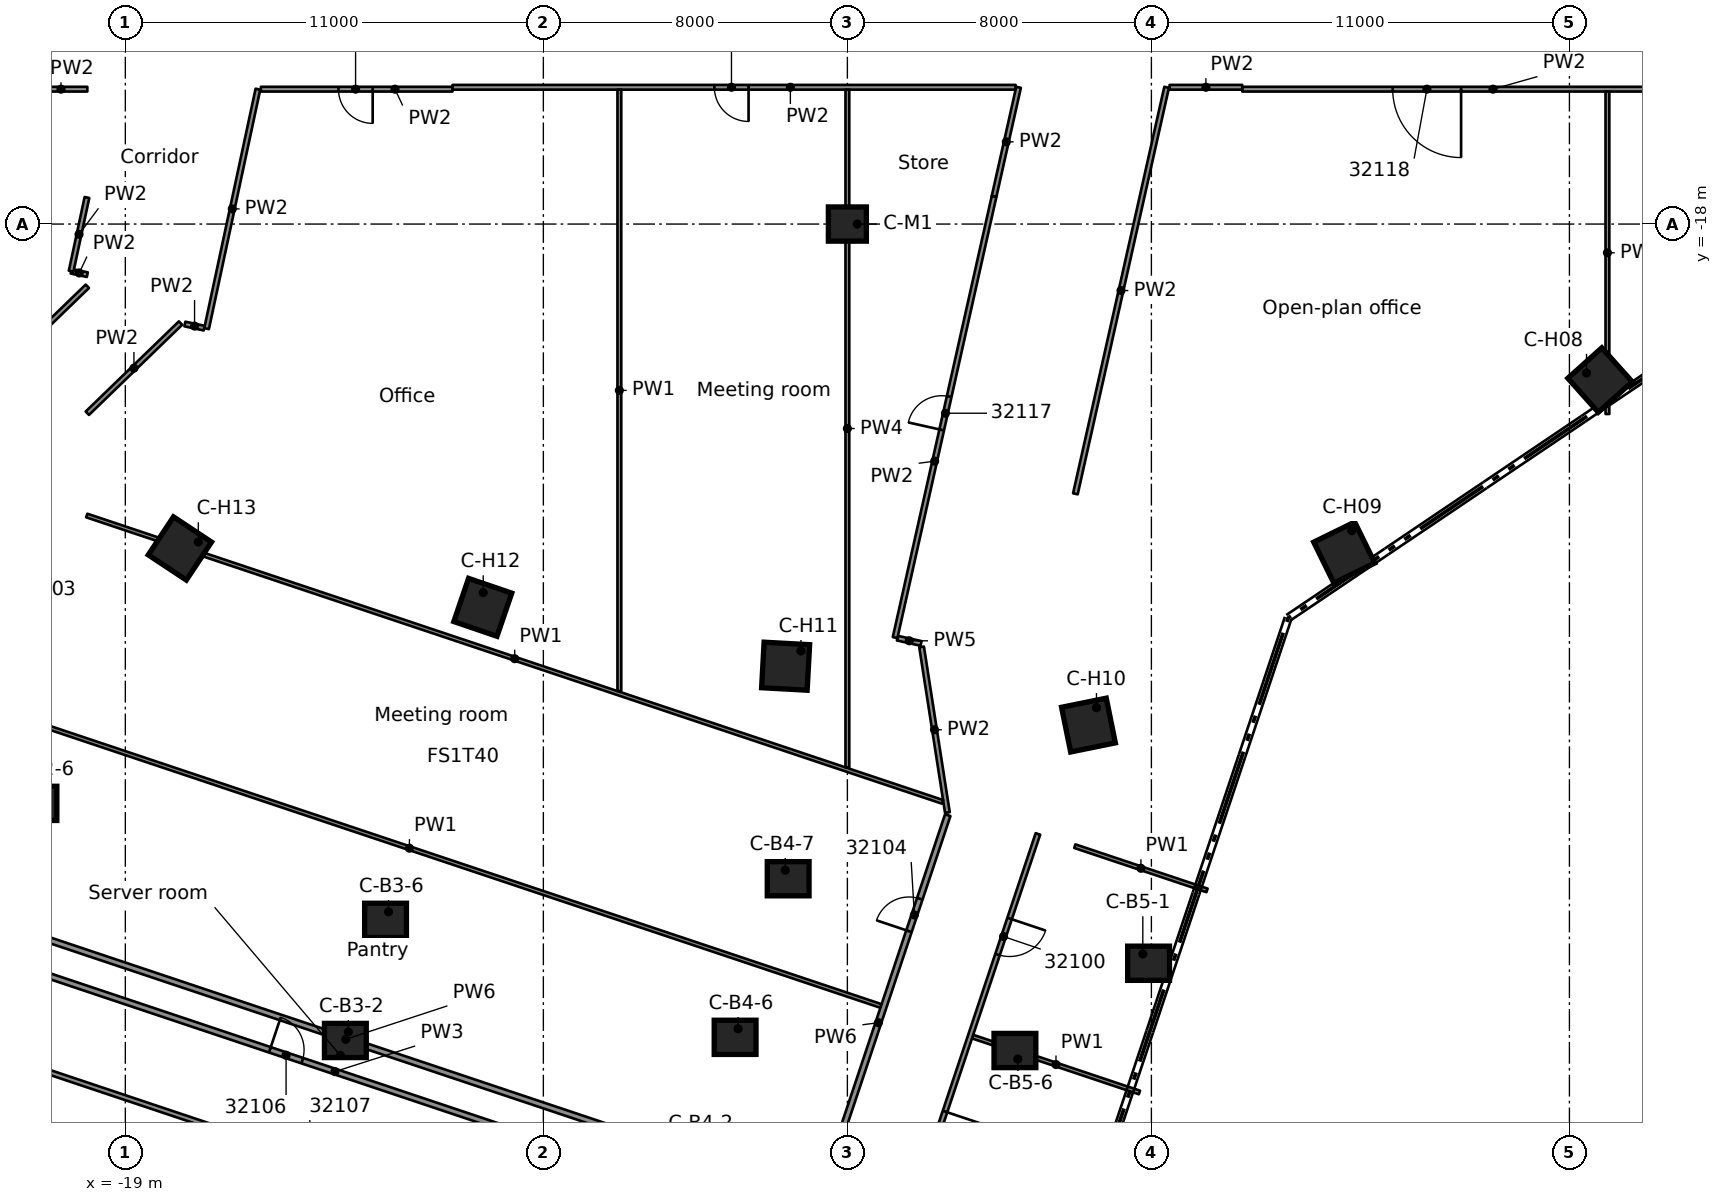
"""IFC4 building model, lengths in metres.
Left out: names, types, materials, properties, quantities, classifications, styles, units other than length and angle.
Written with IfcOpenShell. Run it as: python <this file> out.ifc"""

import sys

from ifc_helpers import new_model, si_unit, direction, frame, frame_2d, origin, origin_2d, place, context, subcontext, project, spatial, rectangle, extrude, element, fill, save


model = new_model("IFC4")
c1 = context("Model", 3, precision=1e-05, world=origin(), true_north=direction((0.0, 1.0)))
c2 = subcontext(c1, "Body", "Model", "MODEL_VIEW")
j1 = project(units=[si_unit("LENGTHUNIT", "METRE"), si_unit("PLANEANGLEUNIT", "RADIAN")], contexts=[c1])
p1 = place(None, origin())
s1 = spatial("IfcSite", under=j1, at=p1, CompositionType="ELEMENT")
p2 = place(p1, origin())
s2 = spatial("IfcBuilding", under=s1, at=p2, CompositionType="ELEMENT")
p3 = place(p2, frame((0.0, 0.0, 159.6)))
s3 = spatial("IfcBuildingStorey", under=s2, at=p3, CompositionType="ELEMENT", Elevation=159.6)
for number, where, z_axis, x_axis in (
    (1, (-21.352, -33.243, 0.0), (0.0, 0.0, 1.0), (1.0, 0.0, 0.0)),
    (2, (-13.21, -39.482, 0.0), (0.0, 0.0, 1.0), (1.0, 0.0, 0.0)),
    (3, (-12.153, -36.321, 0.0), (0.0, 0.0, 1.0), (1.0, 0.0, 0.0)),
    (4, (-2.954, -39.399, 0.0), (0.0, 0.0, 1.0), (1.0, 0.0, 0.0)),
    (5, (-1.558, -35.226, 0.0), (0.0, 0.0, 1.0), (1.0, 0.0, 0.0)),
    (6, (7.926, -37.45, 0.0), (0.0, 0.0, 1.0), (1.0, 0.0, 0.0)),
    (7, (4.409, -39.746, 0.0), (0.0, 0.0, 1.0), (1.0, 0.0, 0.0)),
):
    element("IfcColumn", number, at=place(p3, frame(where, z_axis=z_axis, x_axis=x_axis)), inside=s3, PredefinedType="COLUMN", context=c2, shape_type="SweptSolid", body=[
        extrude(rectangle(XDim=1.1, YDim=0.9, at=origin_2d()), origin(), (0.0, 0.0, 1.0), 3.5),
    ])
for number, where, z_axis, x_axis in (
    (8, (19.806, -22.104, 0.0), (0.0, 0.0, 1.0), (0.667, -0.745, 0.0)),
    (9, (13.075, -26.644, 0.0), (0.0, 0.0, 1.0), (0.441, -0.898, 0.0)),
    (10, (6.344, -31.183, 0.0), (0.0, 0.0, 1.0), (0.199, -0.98, 0.0)),
    (11, (-1.625, -29.634, 0.0), (0.0, 0.0, 1.0), (-0.055, -0.998, 0.0)),
    (12, (-9.594, -28.085, 0.0), (0.0, 0.0, 1.0), (-0.323, -0.946, 0.0)),
    (13, (-17.564, -26.536, 0.0), (0.0, 0.0, 1.0), (-0.552, -0.834, 0.0)),
):
    element("IfcColumn", number, at=place(p3, frame(where, z_axis=z_axis, x_axis=x_axis)), inside=s3, PredefinedType="COLUMN", context=c2, shape_type="SweptSolid", body=[
        extrude(rectangle(XDim=1.2, YDim=1.2, at=origin_2d()), origin(), (0.0, 0.0, 1.0), 3.5),
    ])
p4 = place(p3, frame((0.0, -18.0, 0.0), z_axis=(0.0, 0.0, 1.0), x_axis=(1.0, 0.0, 0.0)))
e14 = element("IfcColumn", 14, at=p4, inside=s3, PredefinedType="COLUMN", context=c2, shape_type="SweptSolid", body=[
    extrude(rectangle(XDim=1.0, YDim=0.9, at=origin_2d()), origin(), (0.0, 0.0, 1.0), 3.5),
])
p5 = place(p3, frame((2.632, -33.485, 0.0), z_axis=(0.0, 0.0, 1.0), x_axis=(-0.153953145405, 0.988078149247, 0.0)))
e15 = element("IfcWall", 15, at=p5, inside=s3, PredefinedType="PARTITIONING", context=c2, shape_type="SweptSolid", body=[
    extrude(rectangle(XDim=4.412, YDim=0.125, at=frame_2d((2.206, 0.0))), origin(), (0.0, 0.0, 1.0), 3.08),
])
p6 = place(p3, frame((-1.829, -46.732, 0.0), z_axis=(0.0, 0.0, 1.0), x_axis=(-0.948329366448, 0.317287586791, 0.0)))
e16 = element("IfcWall", 16, at=p6, inside=s3, PredefinedType="PARTITIONING", context=c2, shape_type="SweptSolid", body=[
    extrude(rectangle(XDim=26.187, YDim=0.125, at=frame_2d((13.094, 0.0))), origin(), (0.0, 0.0, 1.0), 3.08),
])
p7 = place(p6, frame((12.538, 0.0, 0.0)))
e17 = element("IfcOpeningElement", 17, at=p7, cuts=e16, PredefinedType="OPENING", context=c2, shape_type="SweptSolid", body=[
    extrude(rectangle(XDim=0.9, YDim=2.1, at=frame_2d((0.45, 1.05))), frame((0.0, 0.073, 0.0), z_axis=(0.0, -1.0, 0.0), x_axis=(1.0, 0.0, 0.0)), (0.0, 0.0, 1.0), 0.145),
])
p8 = place(p3, frame((-25.889, -36.15, 0.0), z_axis=(0.0, 0.0, 1.0), x_axis=(0.94832621322, -0.317297011205, 0.0)))
e18 = element("IfcWall", 18, at=p8, inside=s3, PredefinedType="PARTITIONING", context=c2, shape_type="SweptSolid", body=[
    extrude(rectangle(XDim=26.162, YDim=0.15, at=frame_2d((13.081, 0.0))), origin(), (0.0, 0.0, 1.0), 3.08),
])
p9 = place(p8, frame((11.275, 0.0, 0.0)))
e19 = element("IfcOpeningElement", 19, at=p9, cuts=e18, PredefinedType="OPENING", context=c2, shape_type="SweptSolid", body=[
    extrude(rectangle(XDim=0.9, YDim=2.1, at=frame_2d((0.45, 1.05))), frame((0.0, 0.085, 0.0), z_axis=(0.0, -1.0, 0.0), x_axis=(1.0, 0.0, 0.0)), (0.0, 0.0, 1.0), 0.17),
])
p10 = place(p3, frame((-25.605, -35.3, 0.0), z_axis=(0.0, 0.0, 1.0), x_axis=(0.948327152728, -0.317294203223, 0.0)))
e20 = element("IfcWall", 20, at=p10, inside=s3, PredefinedType="PARTITIONING", context=c2, shape_type="SweptSolid", body=[
    extrude(rectangle(XDim=26.162, YDim=0.15, at=frame_2d((13.081, 0.0))), origin(), (0.0, 0.0, 1.0), 2.445),
])
p11 = place(p3, frame((-23.935, -30.27, 0.0), z_axis=(0.0, 0.0, 1.0), x_axis=(0.948328260126, -0.317290893418, 0.0)))
e21 = element("IfcWall", 21, at=p11, inside=s3, PredefinedType="PARTITIONING", context=c2, shape_type="SweptSolid", body=[
    extrude(rectangle(XDim=26.175, YDim=0.1, at=frame_2d((13.087, 0.0))), origin(), (0.0, 0.0, 1.0), 3.08),
])
p12 = place(p3, frame((3.294, -39.38, 0.0), z_axis=(0.0, 0.0, 1.0), x_axis=(0.948260676976, -0.317492816455, 0.0)))
e22 = element("IfcWall", 22, at=p12, inside=s3, PredefinedType="PARTITIONING", context=c2, shape_type="SweptSolid", body=[
    extrude(rectangle(XDim=4.631, YDim=0.1, at=frame_2d((2.315, 0.0))), origin(), (0.0, 0.0, 1.0), 3.08),
])
p13 = place(p3, frame((-20.015, -25.669, 0.0), z_axis=(0.0, 0.0, 1.0), x_axis=(0.948326995597, -0.317294672854, 0.0)))
e23 = element("IfcWall", 23, at=p13, inside=s3, PredefinedType="PARTITIONING", context=c2, shape_type="SweptSolid", body=[
    extrude(rectangle(XDim=23.748, YDim=0.1, at=frame_2d((11.874, 0.0))), origin(), (0.0, 0.0, 1.0), 3.08),
])
p14 = place(p3, frame((5.985, -34.369, 0.0), z_axis=(0.0, 0.0, 1.0), x_axis=(0.948323320845, -0.317305655704, 0.0)))
e24 = element("IfcWall", 24, at=p14, inside=s3, PredefinedType="PARTITIONING", context=c2, shape_type="SweptSolid", body=[
    extrude(rectangle(XDim=3.669, YDim=0.1, at=frame_2d((1.834, 0.0))), origin(), (0.0, 0.0, 1.0), 3.08),
])
p15 = place(p3, frame((1.317, -28.896, 0.0), z_axis=(0.0, 0.0, 1.0), x_axis=(0.9759612217, -0.217944244563, 0.0)))
e25 = element("IfcWall", 25, at=p15, inside=s3, PredefinedType="PARTITIONING", context=c2, shape_type="SweptSolid", body=[
    extrude(rectangle(XDim=0.637, YDim=0.125, at=frame_2d((0.319, 0.0))), origin(), (0.0, 0.0, 1.0), 2.445),
])
p16 = place(p3, frame((-17.433, -20.63, 0.0), z_axis=(0.0, 0.0, 1.0), x_axis=(0.977781820865, -0.209625167351, 0.0)))
e26 = element("IfcWall", 26, at=p16, inside=s3, PredefinedType="PARTITIONING", context=c2, shape_type="SweptSolid", body=[
    extrude(rectangle(XDim=0.521, YDim=0.125, at=frame_2d((0.26, 0.0))), origin(), (0.0, 0.0, 1.0), 3.08),
])
p17 = place(p3, frame((-20.425, -19.241, 0.0), z_axis=(0.0, 0.0, 1.0), x_axis=(0.977810632408, -0.209490732848, 0.0)))
e27 = element("IfcWall", 27, at=p17, inside=s3, PredefinedType="PARTITIONING", context=c2, shape_type="SweptSolid", body=[
    extrude(rectangle(XDim=0.435, YDim=0.125, at=frame_2d((0.217, 0.0))), origin(), (0.0, 0.0, 1.0), 3.08),
])
p18 = place(p3, frame((-21.387, -14.451, 0.0), z_axis=(0.0, 0.0, 1.0), x_axis=(1.0, 0.0, 0.0)))
e28 = element("IfcWall", 28, at=p18, inside=s3, PredefinedType="PARTITIONING", context=c2, shape_type="SweptSolid", body=[
    extrude(rectangle(XDim=1.387, YDim=0.125, at=frame_2d((0.693, 0.0))), origin(), (0.0, 0.0, 1.0), 3.08),
])
p19 = place(p3, frame((-10.391, -14.451, 0.0), z_axis=(0.0, 0.0, 1.0), x_axis=(-1.0, 0.0, 0.0)))
e29 = element("IfcWall", 29, at=p19, inside=s3, PredefinedType="PARTITIONING", context=c2, shape_type="SweptSolid", body=[
    extrude(rectangle(XDim=5.043, YDim=0.125, at=frame_2d((2.521, 0.0))), origin(), (0.0, 0.0, 1.0), 3.08),
])
p20 = place(p19, frame((2.1, 0.0, 0.0)))
e30 = element("IfcOpeningElement", 30, at=p20, cuts=e29, PredefinedType="OPENING", context=c2, shape_type="SweptSolid", body=[
    extrude(rectangle(XDim=0.9, YDim=2.1, at=frame_2d((0.45, 1.05))), frame((0.0, 0.073, 0.0), z_axis=(0.0, -1.0, 0.0), x_axis=(1.0, 0.0, 0.0)), (0.0, 0.0, 1.0), 0.145),
])
p21 = place(p3, frame((21.387, -14.451, 0.0), z_axis=(0.0, 0.0, 1.0), x_axis=(-1.0, 0.0, 0.0)))
e31 = element("IfcWall", 31, at=p21, inside=s3, PredefinedType="PARTITIONING", context=c2, shape_type="SweptSolid", body=[
    extrude(rectangle(XDim=10.996, YDim=0.125, at=frame_2d((5.498, 0.0))), origin(), (0.0, 0.0, 1.0), 3.08),
])
p22 = place(p21, frame((5.238, 0.0, 0.0)))
e32 = element("IfcOpeningElement", 32, at=p22, cuts=e31, PredefinedType="OPENING", context=c2, shape_type="SweptSolid", body=[
    extrude(rectangle(XDim=1.8, YDim=2.1, at=frame_2d((0.9, 1.05))), frame((0.0, 0.073, 0.0), z_axis=(0.0, -1.0, 0.0), x_axis=(1.0, 0.0, 0.0)), (0.0, 0.0, 1.0), 0.145),
])
p23 = place(p3, frame((4.427, -14.401, 0.0), z_axis=(0.0, 0.0, 1.0), x_axis=(-1.0, 0.0, 0.0)))
e33 = element("IfcWall", 33, at=p23, inside=s3, PredefinedType="PARTITIONING", context=c2, shape_type="SweptSolid", body=[
    extrude(rectangle(XDim=14.817, YDim=0.125, at=frame_2d((7.408, 0.0))), origin(), (0.0, 0.0, 1.0), 3.08),
])
p24 = place(p23, frame((7.027, 0.0, 0.0)))
e34 = element("IfcOpeningElement", 34, at=p24, cuts=e33, PredefinedType="OPENING", context=c2, shape_type="SweptSolid", body=[
    extrude(rectangle(XDim=0.9, YDim=2.1, at=frame_2d((0.45, 1.05))), frame((0.0, 0.073, 0.0), z_axis=(0.0, -1.0, 0.0), x_axis=(1.0, 0.0, 0.0)), (0.0, 0.0, 1.0), 0.145),
])
p25 = place(p3, frame((8.479, -14.401, 0.0), z_axis=(0.0, 0.0, 1.0), x_axis=(1.0, 0.0, 0.0)))
e35 = element("IfcWall", 35, at=p25, inside=s3, PredefinedType="PARTITIONING", context=c2, shape_type="SweptSolid", body=[
    extrude(rectangle(XDim=1.912, YDim=0.125, at=frame_2d((0.956, 0.0))), origin(), (0.0, 0.0, 1.0), 3.08),
])
p26 = place(p3, frame((-24.354, -23.85, 0.0), z_axis=(0.0, 0.0, 1.0), x_axis=(0.718717121229, 0.695302595747, 0.0)))
e36 = element("IfcWall", 36, at=p26, inside=s3, PredefinedType="PARTITIONING", context=c2, shape_type="SweptSolid", body=[
    extrude(rectangle(XDim=6.058, YDim=0.125, at=frame_2d((3.029, 0.0))), origin(), (0.0, 0.0, 1.0), 3.08),
])
p27 = place(p3, frame((-20.0, -22.978, 0.0), z_axis=(0.0, 0.0, 1.0), x_axis=(0.718705918195, 0.695314175859, 0.0)))
e37 = element("IfcWall", 37, at=p27, inside=s3, PredefinedType="PARTITIONING", context=c2, shape_type="SweptSolid", body=[
    extrude(rectangle(XDim=3.413, YDim=0.125, at=frame_2d((1.707, 0.0))), origin(), (0.0, 0.0, 1.0), 3.08),
])
p28 = place(p3, frame((5.014, -34.047, 0.0), z_axis=(0.0, 0.0, 1.0), x_axis=(-0.317385597106, -0.948296568986, 0.0)))
e38 = element("IfcWall", 38, at=p28, inside=s3, PredefinedType="PARTITIONING", context=c2, shape_type="SweptSolid", body=[
    extrude(rectangle(XDim=18.151, YDim=0.125, at=frame_2d((9.076, 0.0))), origin(), (0.0, 0.0, 1.0), 2.445),
])
p29 = place(p28, frame((2.347, 0.0, 0.0)))
e39 = element("IfcOpeningElement", 39, at=p29, cuts=e38, PredefinedType="OPENING", context=c2, shape_type="SweptSolid", body=[
    extrude(rectangle(XDim=1.0, YDim=2.1, at=frame_2d((0.5, 1.05))), frame((0.0, 0.073, 0.0), z_axis=(0.0, -1.0, 0.0), x_axis=(1.0, 0.0, 0.0)), (0.0, 0.0, 1.0), 0.145),
])
p30 = place(p28, frame((7.703, 0.0, 0.0)))
e40 = element("IfcOpeningElement", 40, at=p30, cuts=e38, PredefinedType="OPENING", context=c2, shape_type="SweptSolid", body=[
    extrude(rectangle(XDim=1.0, YDim=2.1, at=frame_2d((0.5, 1.05))), frame((0.0, 0.073, 0.0), z_axis=(0.0, -1.0, 0.0), x_axis=(1.0, 0.0, 0.0)), (0.0, 0.0, 1.0), 0.145),
])
p31 = place(p28, frame((12.399, 0.0, 0.0)))
e41 = element("IfcOpeningElement", 41, at=p31, cuts=e38, PredefinedType="OPENING", context=c2, shape_type="SweptSolid", body=[
    extrude(rectangle(XDim=1.0, YDim=2.1, at=frame_2d((0.5, 1.05))), frame((0.0, 0.073, 0.0), z_axis=(0.0, -1.0, 0.0), x_axis=(1.0, 0.0, 0.0)), (0.0, 0.0, 1.0), 0.145),
])
p32 = place(p3, frame((-1.008, -44.475, 0.0), z_axis=(0.0, 0.0, 1.0), x_axis=(0.316889155775, 0.948462578572, 0.0)))
e42 = element("IfcWall", 42, at=p32, inside=s3, PredefinedType="PARTITIONING", context=c2, shape_type="SweptSolid", body=[
    extrude(rectangle(XDim=11.516, YDim=0.15, at=frame_2d((5.758, 0.0))), origin(), (0.0, 0.0, 1.0), 2.445),
])
p33 = place(p32, frame((8.296, 0.0, 0.0)))
e43 = element("IfcOpeningElement", 43, at=p33, cuts=e42, PredefinedType="OPENING", context=c2, shape_type="SweptSolid", body=[
    extrude(rectangle(XDim=0.9, YDim=2.1, at=frame_2d((0.45, 1.05))), frame((0.0, 0.085, 0.0), z_axis=(0.0, -1.0, 0.0), x_axis=(1.0, 0.0, 0.0)), (0.0, 0.0, 1.0), 0.17),
])
p34 = place(p3, frame((8.401, -14.401, 0.0), z_axis=(0.0, 0.0, 1.0), x_axis=(-0.218995507843, -0.975725867006, 0.0)))
e44 = element("IfcWall", 44, at=p34, inside=s3, PredefinedType="PARTITIONING", context=c2, shape_type="SweptSolid", body=[
    extrude(rectangle(XDim=10.963, YDim=0.125, at=frame_2d((5.481, 0.0))), origin(), (0.0, 0.0, 1.0), 3.08),
])
p35 = place(p3, frame((3.86, -17.274, 0.0), z_axis=(0.0, 0.0, 1.0), x_axis=(0.218975515368, 0.975730353976, 0.0)))
e45 = element("IfcWall", 45, at=p35, inside=s3, PredefinedType="PARTITIONING", context=c2, shape_type="SweptSolid", body=[
    extrude(rectangle(XDim=2.945, YDim=0.125, at=frame_2d((1.472, 0.0))), origin(), (0.0, 0.0, 1.0), 3.08),
])
p36 = place(p3, frame((1.256, -28.881, 0.0), z_axis=(0.0, 0.0, 1.0), x_axis=(0.218920699835, 0.975742654179, 0.0)))
e46 = element("IfcWall", 46, at=p36, inside=s3, PredefinedType="PARTITIONING", context=c2, shape_type="SweptSolid", body=[
    extrude(rectangle(XDim=11.895, YDim=0.125, at=frame_2d((5.947, 0.0))), origin(), (0.0, 0.0, 1.0), 3.08),
])
p37 = place(p36, frame((5.6, 0.0, 0.0)))
e47 = element("IfcOpeningElement", 47, at=p37, cuts=e46, PredefinedType="OPENING", context=c2, shape_type="SweptSolid", body=[
    extrude(rectangle(XDim=0.9, YDim=2.1, at=frame_2d((0.45, 1.05))), frame((0.0, 0.073, 0.0), z_axis=(0.0, -1.0, 0.0), x_axis=(1.0, 0.0, 0.0)), (0.0, 0.0, 1.0), 0.145),
])
p38 = place(p3, frame((-16.862, -20.752, 0.0), z_axis=(0.0, 0.0, 1.0), x_axis=(0.209655863281, 0.977775239506, 0.0)))
e48 = element("IfcWall", 48, at=p38, inside=s3, PredefinedType="PARTITIONING", context=c2, shape_type="SweptSolid", body=[
    extrude(rectangle(XDim=6.444, YDim=0.125, at=frame_2d((3.222, 0.0))), origin(), (0.0, 0.0, 1.0), 3.08),
])
p39 = place(p3, frame((-20.426, -19.241, 0.0), z_axis=(0.0, 0.0, 1.0), x_axis=(0.20968034996, 0.97776998872, 0.0)))
e49 = element("IfcWall", 49, at=p39, inside=s3, PredefinedType="PARTITIONING", context=c2, shape_type="SweptSolid", body=[
    extrude(rectangle(XDim=1.984, YDim=0.125, at=frame_2d((0.992, 0.0))), origin(), (0.0, 0.0, 1.0), 3.08),
])
p40 = place(p3, frame((20.0, -22.998, 0.0), z_axis=(0.0, 0.0, 1.0), x_axis=(0.0, 1.0, 0.0)))
e50 = element("IfcWall", 50, at=p40, inside=s3, PredefinedType="PARTITIONING", context=c2, shape_type="SweptSolid", body=[
    extrude(rectangle(XDim=8.484, YDim=0.1, at=frame_2d((4.242, 0.0))), origin(), (0.0, 0.0, 1.0), 3.08),
])
p41 = place(p3, frame((0.0, -32.297, 0.0), z_axis=(0.0, 0.0, 1.0), x_axis=(0.0, 1.0, 0.0)))
e51 = element("IfcWall", 51, at=p41, inside=s3, PredefinedType="PARTITIONING", context=c2, shape_type="SweptSolid", body=[
    extrude(rectangle(XDim=17.834, YDim=0.1, at=frame_2d((8.917, 0.0))), origin(), (0.0, 0.0, 1.0), 2.445),
])
p42 = place(p3, frame((-6.0, -30.29, 0.0), z_axis=(0.0, 0.0, 1.0), x_axis=(0.0, 1.0, 0.0)))
e52 = element("IfcWall", 52, at=p42, inside=s3, PredefinedType="PARTITIONING", context=c2, shape_type="SweptSolid", body=[
    extrude(rectangle(XDim=15.827, YDim=0.1, at=frame_2d((7.914, 0.0))), origin(), (0.0, 0.0, 1.0), 3.08),
])
p43 = place(p29, origin())
e53 = element("IfcDoor", 53, at=p43, inside=s3, OperationType="SINGLE_SWING_LEFT", PredefinedType="DOOR", context=c2, shape_type="SweptSolid", body=[
    extrude(rectangle(XDim=1.0, YDim=2.1, at=frame_2d((0.5, 1.05))), frame((0.0, 0.025, 0.0), z_axis=(0.0, -1.0, 0.0), x_axis=(1.0, 0.0, 0.0)), (0.0, 0.0, 1.0), 0.05),
])
fill(e39, e53)
p44 = place(p30, origin())
e54 = element("IfcDoor", 54, at=p44, inside=s3, OperationType="SINGLE_SWING_LEFT", PredefinedType="DOOR", context=c2, shape_type="SweptSolid", body=[
    extrude(rectangle(XDim=1.0, YDim=2.1, at=frame_2d((0.5, 1.05))), frame((0.0, 0.025, 0.0), z_axis=(0.0, -1.0, 0.0), x_axis=(1.0, 0.0, 0.0)), (0.0, 0.0, 1.0), 0.05),
])
fill(e40, e54)
p45 = place(p33, origin())
e55 = element("IfcDoor", 55, at=p45, inside=s3, OperationType="SINGLE_SWING_RIGHT", PredefinedType="DOOR", context=c2, shape_type="SweptSolid", body=[
    extrude(rectangle(XDim=0.9, YDim=2.1, at=frame_2d((0.45, 1.05))), frame((0.0, 0.025, 0.0), z_axis=(0.0, -1.0, 0.0), x_axis=(1.0, 0.0, 0.0)), (0.0, 0.0, 1.0), 0.05),
])
fill(e43, e55)
p46 = place(p9, origin())
e56 = element("IfcDoor", 56, at=p46, inside=s3, OperationType="SINGLE_SWING_LEFT", PredefinedType="DOOR", context=c2, shape_type="SweptSolid", body=[
    extrude(rectangle(XDim=0.9, YDim=2.1, at=frame_2d((0.45, 1.05))), frame((0.0, 0.025, 0.0), z_axis=(0.0, -1.0, 0.0), x_axis=(1.0, 0.0, 0.0)), (0.0, 0.0, 1.0), 0.05),
])
fill(e19, e56)
p47 = place(p20, origin())
e57 = element("IfcDoor", 57, at=p47, inside=s3, OperationType="SINGLE_SWING_RIGHT", PredefinedType="DOOR", context=c2, shape_type="SweptSolid", body=[
    extrude(rectangle(XDim=0.9, YDim=2.1, at=frame_2d((0.45, 1.05))), frame((0.0, 0.025, 0.0), z_axis=(0.0, -1.0, 0.0), x_axis=(1.0, 0.0, 0.0)), (0.0, 0.0, 1.0), 0.05),
])
fill(e30, e57)
p48 = place(p24, origin())
e58 = element("IfcDoor", 58, at=p48, inside=s3, OperationType="SINGLE_SWING_RIGHT", PredefinedType="DOOR", context=c2, shape_type="SweptSolid", body=[
    extrude(rectangle(XDim=0.9, YDim=2.1, at=frame_2d((0.45, 1.05))), frame((0.0, 0.025, 0.0), z_axis=(0.0, -1.0, 0.0), x_axis=(1.0, 0.0, 0.0)), (0.0, 0.0, 1.0), 0.05),
])
fill(e34, e58)
p49 = place(p37, origin())
e59 = element("IfcDoor", 59, at=p49, inside=s3, OperationType="SINGLE_SWING_RIGHT", PredefinedType="DOOR", context=c2, shape_type="SweptSolid", body=[
    extrude(rectangle(XDim=0.9, YDim=2.1, at=frame_2d((0.45, 1.05))), frame((0.0, 0.025, 0.0), z_axis=(0.0, -1.0, 0.0), x_axis=(1.0, 0.0, 0.0)), (0.0, 0.0, 1.0), 0.05),
])
fill(e47, e59)
p50 = place(p22, origin())
e60 = element("IfcDoor", 60, at=p50, inside=s3, OperationType="DOUBLE_DOOR_SINGLE_SWING", PredefinedType="DOOR", context=c2, shape_type="SweptSolid", body=[
    extrude(rectangle(XDim=1.8, YDim=2.1, at=frame_2d((0.9, 1.05))), frame((0.0, 0.025, 0.0), z_axis=(0.0, -1.0, 0.0), x_axis=(1.0, 0.0, 0.0)), (0.0, 0.0, 1.0), 0.05),
])
fill(e32, e60)
save(model, sys.argv[1])
